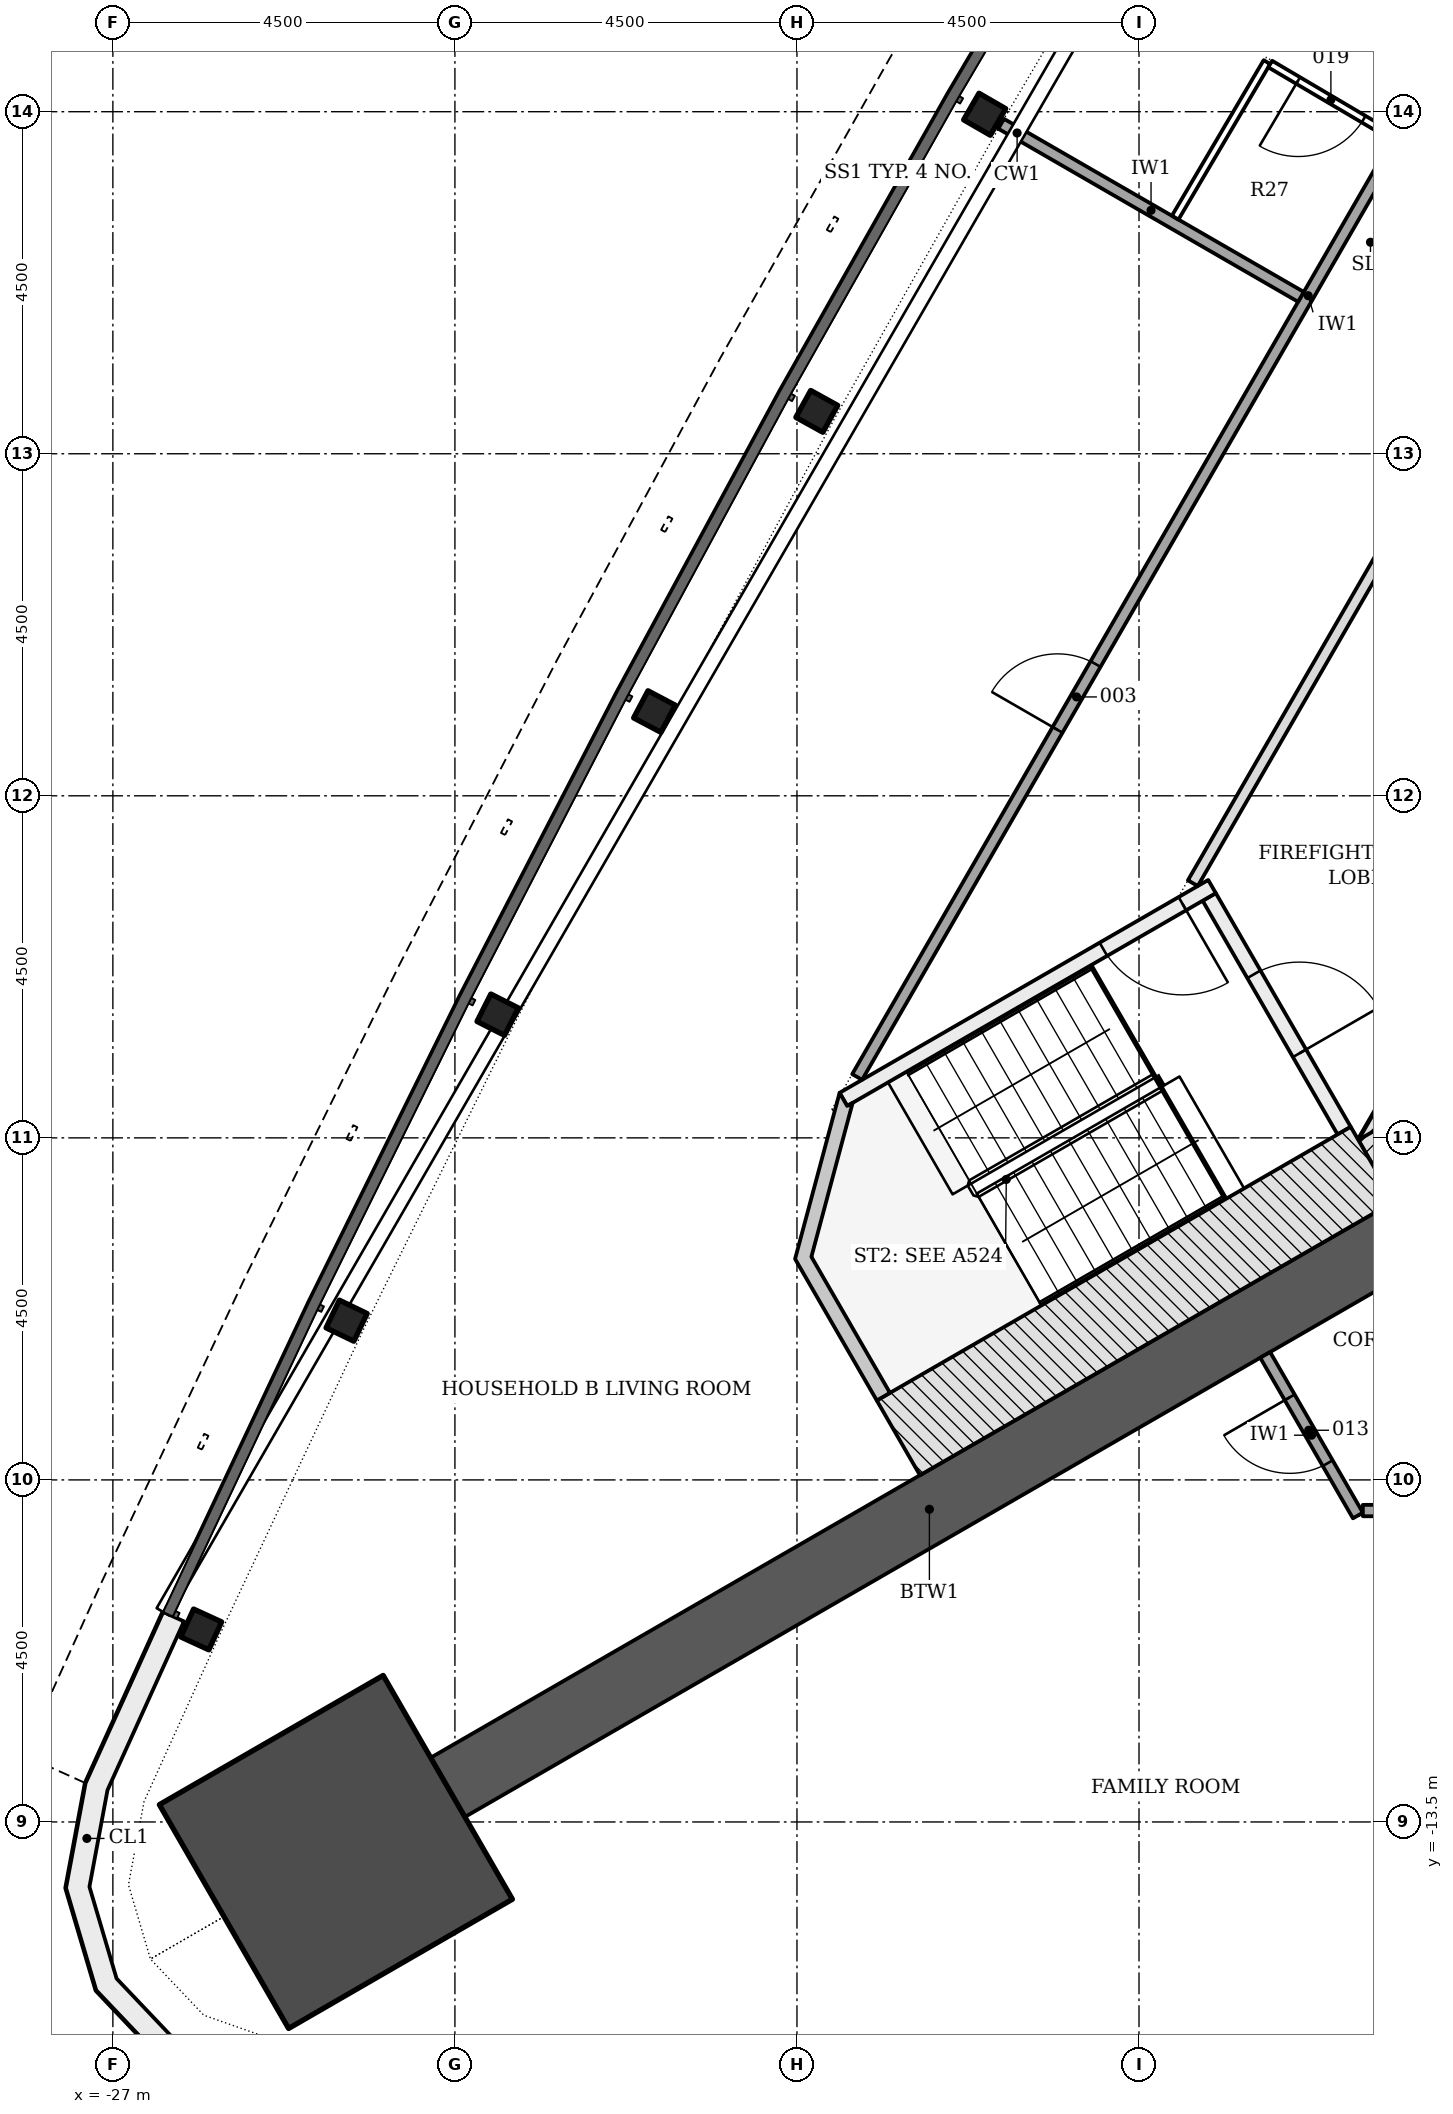
"""IFC4 building model, lengths in metres.
Left out: names, types, materials, properties, quantities, classifications, styles, units other than length and angle.
Written with IfcOpenShell. Run it as: python <this file> out.ifc"""

import sys

from ifc_helpers import new_model, si_unit, direction, frame, frame_2d, origin, origin_2d, place, context, subcontext, project, spatial, polyline, rectangle, i_section, outline, extrude, element, fill, save


model = new_model("IFC4")
c1 = context("Model", 3, precision=1e-05, world=origin(), true_north=direction((0.0, 1.0)))
c2 = subcontext(c1, "Body", "Model", "MODEL_VIEW")
j1 = project(units=[si_unit("LENGTHUNIT", "METRE"), si_unit("PLANEANGLEUNIT", "RADIAN")], contexts=[c1])
p1 = place(None, origin())
s1 = spatial("IfcSite", under=j1, at=p1, CompositionType="ELEMENT")
p2 = place(p1, origin())
s2 = spatial("IfcBuilding", under=s1, at=p2, CompositionType="ELEMENT")
p3 = place(p2, frame((0.0, 0.0, 27.6)))
s3 = spatial("IfcBuildingStorey", under=s2, at=p3, CompositionType="ELEMENT", Elevation=27.6)
p4 = place(p3, frame((-1.083, 11.281, -0.2), z_axis=(0.0, 0.0, 1.0), x_axis=(-0.500001446645, -0.866024568562, 0.0)))
e1 = element("IfcWall", 1, at=p4, inside=s3, PredefinedType="SHEAR", context=c2, shape_type="SweptSolid", body=[
    extrude(rectangle(XDim=18.458, YDim=0.7, at=frame_2d((9.229, 0.0))), origin(), (0.0, 0.0, 1.0), 3.6),
])
p5 = place(p4, frame((8.979, 0.0, 0.2)))
e2 = element("IfcOpeningElement", 2, at=p5, cuts=e1, PredefinedType="OPENING", context=c2, shape_type="SweptSolid", body=[
    extrude(rectangle(XDim=1.2, YDim=2.1, at=frame_2d((0.6, 1.05))), frame((0.0, 0.36, 0.0), z_axis=(0.0, -1.0, 0.0), x_axis=(1.0, 0.0, 0.0)), (0.0, 0.0, 1.0), 0.72),
])
p6 = place(p4, frame((11.029, 0.0, 0.2)))
e3 = element("IfcOpeningElement", 3, at=p6, cuts=e1, PredefinedType="OPENING", context=c2, shape_type="SweptSolid", body=[
    extrude(rectangle(XDim=1.2, YDim=2.1, at=frame_2d((0.6, 1.05))), frame((0.0, 0.36, 0.0), z_axis=(0.0, -1.0, 0.0), x_axis=(1.0, 0.0, 0.0)), (0.0, 0.0, 1.0), 0.72),
])
p7 = place(p3, frame((-10.311, -4.353, -0.2), z_axis=(0.0, 0.0, 1.0), x_axis=(0.500042739161, -0.866000726912, 0.0)))
e4 = element("IfcWall", 4, at=p7, inside=s3, PredefinedType="SHEAR", context=c2, shape_type="SweptSolid", body=[
    extrude(rectangle(XDim=2.771, YDim=0.7, at=frame_2d((1.386, 0.0))), origin(), (0.0, 0.0, 1.0), 3.6),
])
p8 = place(p3, frame((-9.922, -5.728, -0.2), z_axis=(0.0, 0.0, 1.0), x_axis=(-0.866028046028, -0.499995423472, 0.0)))
e5 = element("IfcWall", 5, at=p8, inside=s3, PredefinedType="SHEAR", context=c2, shape_type="SweptSolid", body=[
    extrude(rectangle(XDim=14.633, YDim=0.9, at=frame_2d((7.316, 0.0))), origin(), (0.0, 0.0, 1.0), 3.6),
])
p9 = place(p3, frame((-24.066, -13.895, -0.2), z_axis=(0.0, 0.0, 1.0), x_axis=(-0.866025403784, -0.5, 0.0)))
e6 = element("IfcColumn", 6, at=p9, inside=s3, PredefinedType="COLUMN", context=c2, shape_type="SweptSolid", body=[
    extrude(rectangle(XDim=3.4, YDim=3.4, at=origin_2d()), origin(), (0.0, 0.0, 1.0), 3.6),
])
for number, where, z_axis, x_axis in (
    (7, (-15.531, 8.967, -0.2), (0.0, 0.0, 1.0), (-0.5, -0.866, 0.0)),
    (8, (-17.739, 5.058, -0.2), (0.0, 0.0, 1.0), (-0.484, -0.875, 0.0)),
    (9, (-19.875, 1.108, -0.2), (0.0, 0.0, 1.0), (-0.468, -0.884, 0.0)),
    (10, (-21.937, -2.88, -0.2), (0.0, 0.0, 1.0), (-0.451, -0.893, 0.0)),
    (11, (-23.925, -6.905, -0.2), (0.0, 0.0, 1.0), (-0.434, -0.901, 0.0)),
    (12, (-25.838, -10.967, -0.2), (0.0, 0.0, 1.0), (-0.418, -0.909, 0.0)),
):
    element("IfcColumn", number, at=place(p3, frame(where, z_axis=z_axis, x_axis=x_axis)), inside=s3, PredefinedType="COLUMN", context=c2, shape_type="SweptSolid", body=[
        extrude(i_section(OverallWidth=0.404, OverallDepth=0.406, WebThickness=0.027, FlangeThickness=0.044, FilletRadius=0.015, at=origin_2d()), origin(), (0.0, 0.0, 1.0), 3.6),
    ])
p10 = place(p3, origin())
e13 = element("IfcWall", 13, at=p10, inside=s3, PredefinedType="NOTDEFINED", context=c2, shape_type="SweptSolid", body=[
    extrude(outline(polyline([(-26.338, -10.738), (-27.359, -12.99), (-27.616, -14.369), (-27.218, -15.715), (-26.252, -16.732), (-24.929, -17.199), (-22.468, -17.44), (-22.438, -17.142), (-24.863, -16.904), (-26.084, -16.473), (-26.951, -15.56), (-27.308, -14.353), (-27.071, -13.08), (-26.064, -10.861), (-26.338, -10.738)])), origin(), (0.0, 0.0, 1.0), 3.3),
])
p11 = place(p3, frame((-12.576, -1.331, -0.2), z_axis=(0.0, 0.0, 1.0), x_axis=(0.499970499736, -0.8660424351, 0.0)))
e14 = element("IfcWall", 14, at=p11, inside=s3, PredefinedType="SHEAR", context=c2, shape_type="SweptSolid", body=[
    extrude(rectangle(XDim=3.55, YDim=0.2, at=frame_2d((1.775, 0.0))), origin(), (0.0, 0.0, 1.0), 3.6),
])
p12 = place(p11, frame((1.175, 0.0, 0.2)))
e15 = element("IfcOpeningElement", 15, at=p12, cuts=e14, PredefinedType="OPENING", context=c2, shape_type="SweptSolid", body=[
    extrude(rectangle(XDim=1.2, YDim=2.1, at=frame_2d((0.6, 1.05))), frame((0.0, 0.11, 0.0), z_axis=(0.0, -1.0, 0.0), x_axis=(1.0, 0.0, 0.0)), (0.0, 0.0, 1.0), 0.22),
])
p13 = place(p3, frame((-12.539, -1.194, -0.2), z_axis=(0.0, 0.0, 1.0), x_axis=(-0.866045472092, -0.499965239061, 0.0)))
e16 = element("IfcWall", 16, at=p13, inside=s3, PredefinedType="SHEAR", context=c2, shape_type="SweptSolid", body=[
    extrude(rectangle(XDim=5.6, YDim=0.2, at=frame_2d((2.8, 0.0))), origin(), (0.0, 0.0, 1.0), 3.6),
])
p14 = place(p13, frame((0.45, 0.0, 0.2)))
e17 = element("IfcOpeningElement", 17, at=p14, cuts=e16, PredefinedType="OPENING", context=c2, shape_type="SweptSolid", body=[
    extrude(rectangle(XDim=1.2, YDim=2.1, at=frame_2d((0.6, 1.05))), frame((0.0, 0.11, 0.0), z_axis=(0.0, -1.0, 0.0), x_axis=(1.0, 0.0, 0.0)), (0.0, 0.0, 1.0), 0.22),
])
p15 = place(p3, frame((-10.43, -4.847, -0.2), z_axis=(0.0, 0.0, 1.0), x_axis=(-0.866018442252, -0.500012057535, 0.0)))
e18 = element("IfcWall", 18, at=p15, inside=s3, PredefinedType="SHEAR", context=c2, shape_type="SweptSolid", body=[
    extrude(rectangle(XDim=7.2, YDim=1.136, at=frame_2d((3.6, 0.0))), origin(), (0.0, 0.0, 1.0), 3.6),
])
p16 = place(p3, frame((0.0, 0.0, -0.2)))
e19 = element("IfcWall", 19, at=p16, inside=s3, PredefinedType="SHEAR", context=c2, shape_type="SweptSolid", body=[
    extrude(outline(polyline([(-17.439, -3.907), (-18.025, -6.093), (-16.95, -7.955), (-16.777, -7.855), (-17.81, -6.065), (-17.267, -4.039), (-17.339, -4.081), (-17.339, -4.081), (-17.339, -4.081), (-17.339, -4.081), (-17.339, -4.081), (-17.339, -4.081), (-17.339, -4.081), (-17.339, -4.081), (-17.339, -4.081), (-17.339, -4.081), (-17.339, -4.081), (-17.339, -4.081), (-17.339, -4.081), (-17.339, -4.081), (-17.339, -4.081), (-17.339, -4.081), (-17.339, -4.081), (-17.439, -3.907)])), origin(), (0.0, 0.0, 1.0), 3.6),
])
p17 = place(p3, frame((-17.208, -3.699, 0.0), z_axis=(0.0, 0.0, 1.0), x_axis=(0.499997567621, 0.866026808115, 0.0)))
e20 = element("IfcWall", 20, at=p17, inside=s3, PredefinedType="PARTITIONING", context=c2, shape_type="SweptSolid", body=[
    extrude(rectangle(XDim=23.736, YDim=0.15, at=frame_2d((11.868, 0.0))), origin(), (0.0, 0.0, 1.0), 2.768),
])
p18 = place(p17, frame((16.656, 0.0, 0.0)))
e21 = element("IfcOpeningElement", 21, at=p18, cuts=e20, PredefinedType="OPENING", context=c2, shape_type="SweptSolid", body=[
    extrude(rectangle(XDim=1.1, YDim=2.1, at=frame_2d((0.55, 1.05))), frame((0.0, 0.085, 0.0), z_axis=(0.0, -1.0, 0.0), x_axis=(1.0, 0.0, 0.0)), (0.0, 0.0, 1.0), 0.17),
])
p19 = place(p17, frame((14.662, 0.0, 0.0)))
e22 = element("IfcOpeningElement", 22, at=p19, cuts=e20, PredefinedType="OPENING", context=c2, shape_type="SweptSolid", body=[
    extrude(rectangle(XDim=1.1, YDim=2.1, at=frame_2d((0.55, 1.05))), frame((0.0, 0.085, 0.0), z_axis=(0.0, -1.0, 0.0), x_axis=(1.0, 0.0, 0.0)), (0.0, 0.0, 1.0), 0.17),
])
p20 = place(p17, frame((5.273, 0.0, 0.0)))
e23 = element("IfcOpeningElement", 23, at=p20, cuts=e20, PredefinedType="OPENING", context=c2, shape_type="SweptSolid", body=[
    extrude(rectangle(XDim=1.0, YDim=2.1, at=frame_2d((0.5, 1.05))), frame((0.0, 0.085, 0.0), z_axis=(0.0, -1.0, 0.0), x_axis=(1.0, 0.0, 0.0)), (0.0, 0.0, 1.0), 0.17),
])
p21 = place(p3, frame((-4.407, 13.374, 0.0), z_axis=(0.0, 0.0, 1.0), x_axis=(-0.499997181693, -0.866027030928, 0.0)))
e24 = element("IfcWall", 24, at=p21, inside=s3, PredefinedType="PARTITIONING", context=c2, shape_type="SweptSolid", body=[
    extrude(rectangle(XDim=16.77, YDim=0.15, at=frame_2d((8.385, 0.0))), origin(), (0.0, 0.0, 1.0), 2.768),
])
p22 = place(p21, frame((8.879, 0.0, 0.0)))
e25 = element("IfcOpeningElement", 25, at=p22, cuts=e24, PredefinedType="OPENING", context=c2, shape_type="SweptSolid", body=[
    extrude(rectangle(XDim=1.0, YDim=2.1, at=frame_2d((0.5, 1.05))), frame((0.0, 0.085, 0.0), z_axis=(0.0, -1.0, 0.0), x_axis=(1.0, 0.0, 0.0)), (0.0, 0.0, 1.0), 0.17),
])
p23 = place(p3, frame((-10.62, -9.468, 0.0), z_axis=(0.0, 0.0, 1.0), x_axis=(-0.500045838785, 0.865998937132, 0.0)))
e26 = element("IfcWall", 26, at=p23, inside=s3, PredefinedType="PARTITIONING", context=c2, shape_type="SweptSolid", body=[
    extrude(rectangle(XDim=2.44, YDim=0.15, at=frame_2d((1.22, 0.0))), origin(), (0.0, 0.0, 1.0), 3.4),
])
p24 = place(p23, frame((0.795, 0.0, 0.0)))
e27 = element("IfcOpeningElement", 27, at=p24, cuts=e26, PredefinedType="OPENING", context=c2, shape_type="SweptSolid", body=[
    extrude(rectangle(XDim=1.0, YDim=2.1, at=frame_2d((0.5, 1.05))), frame((0.0, 0.085, 0.0), z_axis=(0.0, -1.0, 0.0), x_axis=(1.0, 0.0, 0.0)), (0.0, 0.0, 1.0), 0.17),
])
p25 = place(p3, frame((-10.555, -9.403, 0.0), z_axis=(0.0, 0.0, 1.0), x_axis=(1.0, 0.0, 0.0)))
e28 = element("IfcWall", 28, at=p25, inside=s3, PredefinedType="PARTITIONING", context=c2, shape_type="SweptSolid", body=[
    extrude(rectangle(XDim=1.326, YDim=0.15, at=frame_2d((0.663, 0.0))), origin(), (0.0, 0.0, 1.0), 3.4),
])
p26 = place(p3, frame((-15.314, 8.842, 0.0), z_axis=(0.0, 0.0, 1.0), x_axis=(0.866031166731, -0.499990018151, 0.0)))
e29 = element("IfcWall", 29, at=p26, inside=s3, PredefinedType="PARTITIONING", context=c2, shape_type="SweptSolid", body=[
    extrude(rectangle(XDim=4.555, YDim=0.15, at=frame_2d((2.277, 0.0))), origin(), (0.0, 0.0, 1.0), 2.768),
])
p27 = place(p3, frame((-13.024, 7.606, 0.0), z_axis=(0.0, 0.0, 1.0), x_axis=(0.508012392693, 0.861349759895, 0.0)))
e30 = element("IfcWall", 30, at=p27, inside=s3, PredefinedType="PARTITIONING", context=c2, shape_type="SweptSolid", body=[
    extrude(rectangle(XDim=2.375, YDim=0.1, at=frame_2d((1.188, 0.0))), origin(), (0.0, 0.0, 1.0), 2.768),
])
p28 = place(p3, frame((-10.153, 8.671, 0.0), z_axis=(0.0, 0.0, 1.0), x_axis=(-0.861326599867, 0.508051659147, 0.0)))
e31 = element("IfcWall", 31, at=p28, inside=s3, PredefinedType="PARTITIONING", context=c2, shape_type="SweptSolid", body=[
    extrude(rectangle(XDim=1.882, YDim=0.1, at=frame_2d((0.941, 0.0))), origin(), (0.0, 0.0, 1.0), 3.4),
])
p29 = place(p28, frame((0.455, 0.0, 0.0)))
e32 = element("IfcOpeningElement", 32, at=p29, cuts=e31, PredefinedType="OPENING", context=c2, shape_type="SweptSolid", body=[
    extrude(rectangle(XDim=1.0, YDim=2.1, at=frame_2d((0.5, 1.05))), frame((0.0, 0.06, 0.0), z_axis=(0.0, -1.0, 0.0), x_axis=(1.0, 0.0, 0.0)), (0.0, 0.0, 1.0), 0.12),
])
p30 = place(p12, origin())
e33 = element("IfcDoor", 33, at=p30, inside=s3, OperationType="SINGLE_SWING_RIGHT", PredefinedType="DOOR", context=c2, shape_type="SweptSolid", body=[
    extrude(rectangle(XDim=1.2, YDim=2.1, at=frame_2d((0.6, 1.05))), frame((0.0, 0.025, 0.0), z_axis=(0.0, -1.0, 0.0), x_axis=(1.0, 0.0, 0.0)), (0.0, 0.0, 1.0), 0.05),
])
fill(e15, e33)
p31 = place(p14, origin())
e34 = element("IfcDoor", 34, at=p31, inside=s3, OperationType="SINGLE_SWING_LEFT", PredefinedType="DOOR", context=c2, shape_type="SweptSolid", body=[
    extrude(rectangle(XDim=1.2, YDim=2.1, at=frame_2d((0.6, 1.05))), frame((0.0, 0.025, 0.0), z_axis=(0.0, -1.0, 0.0), x_axis=(1.0, 0.0, 0.0)), (0.0, 0.0, 1.0), 0.05),
])
fill(e17, e34)
p32 = place(p20, origin())
e35 = element("IfcDoor", 35, at=p32, inside=s3, OperationType="SINGLE_SWING_LEFT", PredefinedType="DOOR", context=c2, shape_type="SweptSolid", body=[
    extrude(rectangle(XDim=1.0, YDim=2.1, at=frame_2d((0.5, 1.05))), frame((0.0, 0.025, 0.0), z_axis=(0.0, -1.0, 0.0), x_axis=(1.0, 0.0, 0.0)), (0.0, 0.0, 1.0), 0.05),
])
fill(e23, e35)
p33 = place(p24, origin())
e36 = element("IfcDoor", 36, at=p33, inside=s3, OperationType="SINGLE_SWING_RIGHT", PredefinedType="DOOR", context=c2, shape_type="SweptSolid", body=[
    extrude(rectangle(XDim=1.0, YDim=2.1, at=frame_2d((0.5, 1.05))), frame((0.0, 0.025, 0.0), z_axis=(0.0, -1.0, 0.0), x_axis=(1.0, 0.0, 0.0)), (0.0, 0.0, 1.0), 0.05),
])
fill(e27, e36)
p34 = place(p29, origin())
e37 = element("IfcDoor", 37, at=p34, inside=s3, OperationType="SINGLE_SWING_RIGHT", PredefinedType="DOOR", context=c2, shape_type="SweptSolid", body=[
    extrude(rectangle(XDim=1.0, YDim=2.1, at=frame_2d((0.5, 1.05))), frame((0.0, 0.025, 0.0), z_axis=(0.0, -1.0, 0.0), x_axis=(1.0, 0.0, 0.0)), (0.0, 0.0, 1.0), 0.05),
])
fill(e32, e37)
save(model, sys.argv[1])
